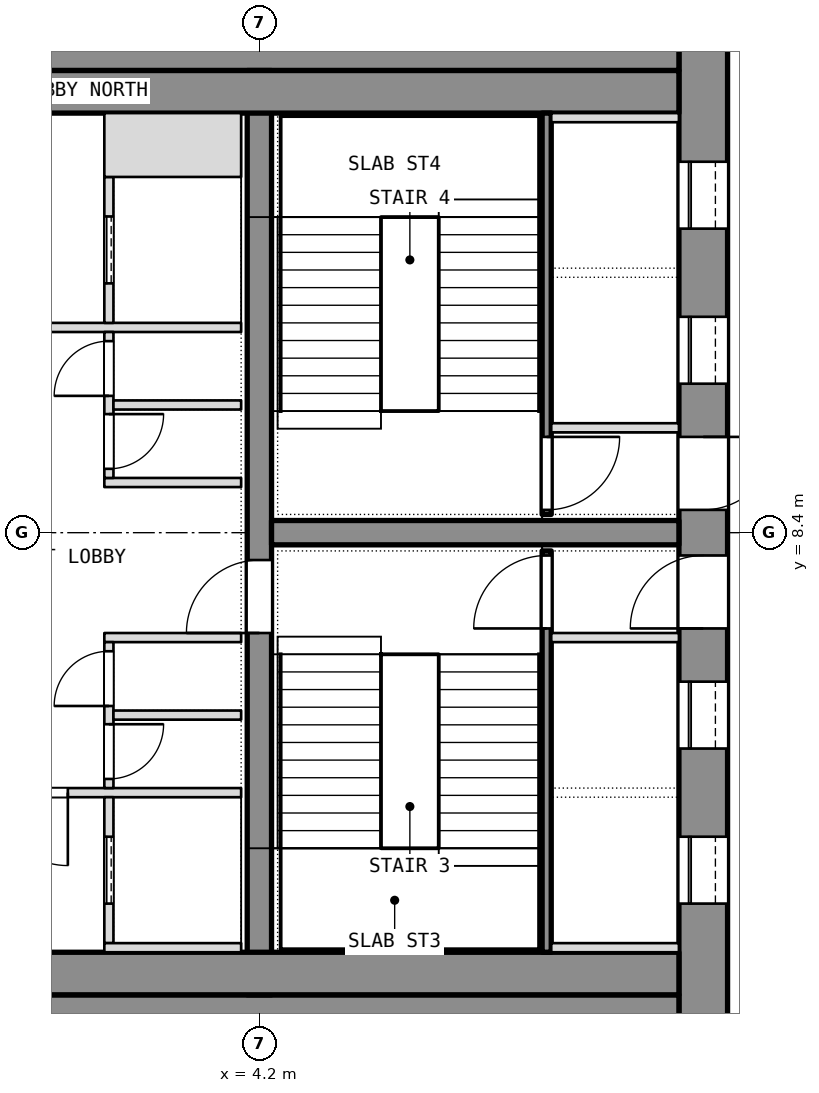
"""IFC4 building model, lengths in metres.
Left out: names, types, materials, properties, quantities, classifications, styles, units other than length and angle.
Written with IfcOpenShell. Run it as: python <this file> out.ifc"""

import sys

from ifc_helpers import new_model, si_unit, direction, frame, frame_2d, origin, place, context, subcontext, project, spatial, rectangle, extrude, element, fill, save


model = new_model("IFC4")
c1 = context("Model", 3, precision=1e-05, world=origin(), true_north=direction((0.0, 1.0)))
c2 = subcontext(c1, "Body", "Model", "MODEL_VIEW")
j1 = project(units=[si_unit("LENGTHUNIT", "METRE"), si_unit("PLANEANGLEUNIT", "RADIAN")], contexts=[c1])
p1 = place(None, origin())
s1 = spatial("IfcSite", under=j1, at=p1, CompositionType="ELEMENT")
p2 = place(p1, origin())
s2 = spatial("IfcBuilding", under=s1, at=p2, CompositionType="ELEMENT")
p3 = place(p2, frame((0.0, 0.0, 212.9)))
s3 = spatial("IfcBuildingStorey", under=s2, at=p3, CompositionType="ELEMENT", Elevation=212.9)
p4 = place(p3, frame((11.5, 0.0, 0.0), z_axis=(0.0, 0.0, 1.0), x_axis=(0.0, 1.0, 0.0)))
e1 = element("IfcWall", 1, at=p4, inside=s3, PredefinedType="SHEAR", context=c2, shape_type="SweptSolid", body=[
    extrude(rectangle(XDim=16.8, YDim=0.8, at=frame_2d((8.4, 0.0))), origin(), (0.0, 0.0, 1.0), 3.6),
])
p5 = place(p4, frame((2.3, 0.0, 0.0)))
e2 = element("IfcOpeningElement", 2, at=p5, cuts=e1, PredefinedType="OPENING", context=c2, shape_type="SweptSolid", body=[
    extrude(rectangle(XDim=1.1, YDim=2.1, at=frame_2d((0.55, 1.05))), frame((0.0, 0.4, 0.0), z_axis=(0.0, -1.0, 0.0), x_axis=(1.0, 0.0, 0.0)), (0.0, 0.0, 1.0), 0.8),
])
p6 = place(p4, frame((4.85, 0.0, 0.0)))
e3 = element("IfcOpeningElement", 3, at=p6, cuts=e1, PredefinedType="OPENING", context=c2, shape_type="SweptSolid", body=[
    extrude(rectangle(XDim=1.1, YDim=2.1, at=frame_2d((0.55, 1.05))), frame((0.0, 0.4, 0.0), z_axis=(0.0, -1.0, 0.0), x_axis=(1.0, 0.0, 0.0)), (0.0, 0.0, 1.0), 0.8),
])
p7 = place(p4, frame((6.825, 0.0, 0.0)))
e4 = element("IfcOpeningElement", 4, at=p7, cuts=e1, PredefinedType="OPENING", context=c2, shape_type="SweptSolid", body=[
    extrude(rectangle(XDim=1.2, YDim=2.1, at=frame_2d((0.6, 1.05))), frame((0.0, 0.4, 0.0), z_axis=(0.0, -1.0, 0.0), x_axis=(1.0, 0.0, 0.0)), (0.0, 0.0, 1.0), 0.8),
])
p8 = place(p4, frame((13.4, 0.0, 0.0)))
e5 = element("IfcOpeningElement", 5, at=p8, cuts=e1, PredefinedType="OPENING", context=c2, shape_type="SweptSolid", body=[
    extrude(rectangle(XDim=1.1, YDim=2.1, at=frame_2d((0.55, 1.05))), frame((0.0, 0.4, 0.0), z_axis=(0.0, -1.0, 0.0), x_axis=(1.0, 0.0, 0.0)), (0.0, 0.0, 1.0), 0.8),
])
p9 = place(p4, frame((10.85, 0.0, 0.0)))
e6 = element("IfcOpeningElement", 6, at=p9, cuts=e1, PredefinedType="OPENING", context=c2, shape_type="SweptSolid", body=[
    extrude(rectangle(XDim=1.1, YDim=2.1, at=frame_2d((0.55, 1.05))), frame((0.0, 0.4, 0.0), z_axis=(0.0, -1.0, 0.0), x_axis=(1.0, 0.0, 0.0)), (0.0, 0.0, 1.0), 0.8),
])
p10 = place(p4, frame((8.775, 0.0, 0.0)))
e7 = element("IfcOpeningElement", 7, at=p10, cuts=e1, PredefinedType="OPENING", context=c2, shape_type="SweptSolid", body=[
    extrude(rectangle(XDim=1.2, YDim=2.1, at=frame_2d((0.6, 1.05))), frame((0.0, 0.4, 0.0), z_axis=(0.0, -1.0, 0.0), x_axis=(1.0, 0.0, 0.0)), (0.0, 0.0, 1.0), 0.8),
])
for number, where, z_axis, x_axis in (
    (8, (-11.1, 0.4, 0.0), (0.0, 0.0, 1.0), (1.0, 0.0, 0.0)),
    (9, (-11.1, 16.4, 0.0), (0.0, 0.0, 1.0), (1.0, 0.0, 0.0)),
):
    element("IfcWall", number, at=place(p3, frame(where, z_axis=z_axis, x_axis=x_axis)), inside=s3, PredefinedType="SHEAR", context=c2, shape_type="SweptSolid", body=[
        extrude(rectangle(XDim=22.2, YDim=0.8, at=frame_2d((11.1, 0.0))), origin(), (0.0, 0.0, 1.0), 3.6),
    ])
p11 = place(p3, frame((4.2, 0.8, 0.0), z_axis=(0.0, 0.0, 1.0), x_axis=(0.0, 1.0, 0.0)))
e10 = element("IfcWall", 10, at=p11, inside=s3, PredefinedType="SHEAR", context=c2, shape_type="SweptSolid", body=[
    extrude(rectangle(XDim=15.2, YDim=0.4, at=frame_2d((7.6, 0.0))), origin(), (0.0, 0.0, 1.0), 3.6),
])
p12 = place(p11, frame((5.95, 0.0, 0.0)))
e11 = element("IfcOpeningElement", 11, at=p12, cuts=e10, PredefinedType="OPENING", context=c2, shape_type="SweptSolid", body=[
    extrude(rectangle(XDim=1.2, YDim=2.1, at=frame_2d((0.6, 1.05))), frame((0.0, 0.2, 0.0), z_axis=(0.0, -1.0, 0.0), x_axis=(1.0, 0.0, 0.0)), (0.0, 0.0, 1.0), 0.4),
])
p13 = place(p3, frame((4.4, 8.4, 0.0), z_axis=(0.0, 0.0, 1.0), x_axis=(1.0, 0.0, 0.0)))
e12 = element("IfcWall", 12, at=p13, inside=s3, PredefinedType="SHEAR", context=c2, shape_type="SweptSolid", body=[
    extrude(rectangle(XDim=6.7, YDim=0.4, at=frame_2d((3.35, 0.0))), origin(), (0.0, 0.0, 1.0), 3.6),
])
for number, where, z_axis, x_axis in (
    (13, (-11.1, 1.15, 0.0), (0.0, 0.0, 1.0), (1.0, 0.0, 0.0)),
    (14, (-11.1, 15.65, 0.0), (0.0, 0.0, 1.0), (1.0, 0.0, 0.0)),
):
    element("IfcWall", number, at=place(p3, frame(where, z_axis=z_axis, x_axis=x_axis)), inside=s3, PredefinedType="PARTITIONING", context=c2, shape_type="SweptSolid", body=[
        extrude(rectangle(XDim=22.2, YDim=0.7, at=frame_2d((11.1, 0.0))), origin(), (0.0, 0.0, 1.0), 3.34),
    ])
p14 = place(p3, frame((8.925, 1.5, 0.0), z_axis=(0.0, 0.0, 1.0), x_axis=(0.0, 1.0, 0.0)))
e15 = element("IfcWall", 15, at=p14, inside=s3, PredefinedType="SHEAR", context=c2, shape_type="SweptSolid", body=[
    extrude(rectangle(XDim=6.6, YDim=0.15, at=frame_2d((3.3, 0.0))), origin(), (0.0, 0.0, 1.0), 3.34),
])
p15 = place(p14, frame((5.325, 0.0, 0.0)))
e16 = element("IfcOpeningElement", 16, at=p15, cuts=e15, PredefinedType="OPENING", context=c2, shape_type="SweptSolid", body=[
    extrude(rectangle(XDim=1.2, YDim=2.1, at=frame_2d((0.6, 1.05))), frame((0.0, 0.075, 0.0), z_axis=(0.0, -1.0, 0.0), x_axis=(1.0, 0.0, 0.0)), (0.0, 0.0, 1.0), 0.15),
])
for number, where, z_axis, x_axis in (
    (17, (9.0, 6.675, 0.0), (0.0, 0.0, 1.0), (1.0, 0.0, 0.0)),
    (18, (9.0, 1.575, 0.0), (0.0, 0.0, 1.0), (1.0, 0.0, 0.0)),
):
    element("IfcWall", number, at=place(p3, frame(where, z_axis=z_axis, x_axis=x_axis)), inside=s3, PredefinedType="SHEAR", context=c2, shape_type="SweptSolid", body=[
        extrude(rectangle(XDim=2.1, YDim=0.15, at=frame_2d((1.05, 0.0))), origin(), (0.0, 0.0, 1.0), 3.6),
    ])
p16 = place(p3, frame((8.925, 8.7, 0.0), z_axis=(0.0, 0.0, 1.0), x_axis=(0.0, 1.0, 0.0)))
e19 = element("IfcWall", 19, at=p16, inside=s3, PredefinedType="SHEAR", context=c2, shape_type="SweptSolid", body=[
    extrude(rectangle(XDim=6.6, YDim=0.15, at=frame_2d((3.3, 0.0))), origin(), (0.0, 0.0, 1.0), 3.34),
])
p17 = place(p16, frame((0.075, 0.0, 0.0)))
e20 = element("IfcOpeningElement", 20, at=p17, cuts=e19, PredefinedType="OPENING", context=c2, shape_type="SweptSolid", body=[
    extrude(rectangle(XDim=1.2, YDim=2.1, at=frame_2d((0.6, 1.05))), frame((0.0, 0.075, 0.0), z_axis=(0.0, -1.0, 0.0), x_axis=(1.0, 0.0, 0.0)), (0.0, 0.0, 1.0), 0.15),
])
for number, where, z_axis, x_axis in (
    (21, (9.0, 10.125, 0.0), (0.0, 0.0, 1.0), (1.0, 0.0, 0.0)),
    (22, (9.0, 15.225, 0.0), (0.0, 0.0, 1.0), (1.0, 0.0, 0.0)),
):
    element("IfcWall", number, at=place(p3, frame(where, z_axis=z_axis, x_axis=x_axis)), inside=s3, PredefinedType="SHEAR", context=c2, shape_type="SweptSolid", body=[
        extrude(rectangle(XDim=2.1, YDim=0.15, at=frame_2d((1.05, 0.0))), origin(), (0.0, 0.0, 1.0), 3.6),
    ])
p18 = place(p3, frame((-3.9, 4.125, 0.0), z_axis=(0.0, 0.0, 1.0), x_axis=(1.0, 0.0, 0.0)))
e23 = element("IfcWall", 23, at=p18, inside=s3, PredefinedType="PARTITIONING", context=c2, shape_type="SweptSolid", body=[
    extrude(rectangle(XDim=7.8, YDim=0.15, at=frame_2d((3.9, 0.0))), origin(), (0.0, 0.0, 1.0), 3.34),
])
p19 = place(p18, frame((3.75, 0.0, 0.0)))
e24 = element("IfcOpeningElement", 24, at=p19, cuts=e23, PredefinedType="OPENING", context=c2, shape_type="SweptSolid", body=[
    extrude(rectangle(XDim=1.2, YDim=2.1, at=frame_2d((0.6, 1.05))), frame((0.0, 0.075, 0.0), z_axis=(0.0, -1.0, 0.0), x_axis=(1.0, 0.0, 0.0)), (0.0, 0.0, 1.0), 0.15),
])
p20 = place(p3, frame((-3.9, 11.775, 0.0), z_axis=(0.0, 0.0, 1.0), x_axis=(1.0, 0.0, 0.0)))
e25 = element("IfcWall", 25, at=p20, inside=s3, PredefinedType="PARTITIONING", context=c2, shape_type="SweptSolid", body=[
    extrude(rectangle(XDim=7.8, YDim=0.15, at=frame_2d((3.9, 0.0))), origin(), (0.0, 0.0, 1.0), 3.34),
])
p21 = place(p20, frame((3.3, 0.0, 0.0)))
e26 = element("IfcOpeningElement", 26, at=p21, cuts=e25, PredefinedType="OPENING", context=c2, shape_type="SweptSolid", body=[
    extrude(rectangle(XDim=1.2, YDim=2.1, at=frame_2d((0.6, 1.05))), frame((0.0, 0.075, 0.0), z_axis=(0.0, -1.0, 0.0), x_axis=(1.0, 0.0, 0.0)), (0.0, 0.0, 1.0), 0.15),
])
p22 = place(p3, frame((1.725, 1.65, 0.0), z_axis=(0.0, 0.0, 1.0), x_axis=(0.0, 1.0, 0.0)))
e27 = element("IfcWall", 27, at=p22, inside=s3, PredefinedType="SHEAR", context=c2, shape_type="SweptSolid", body=[
    extrude(rectangle(XDim=2.4, YDim=0.15, at=frame_2d((1.2, 0.0))), origin(), (0.0, 0.0, 1.0), 3.6),
])
p23 = place(p22, frame((0.65, 0.0, 0.0)))
e28 = element("IfcOpeningElement", 28, at=p23, cuts=e27, PredefinedType="OPENING", context=c2, shape_type="SweptSolid", body=[
    extrude(rectangle(XDim=1.1, YDim=2.1, at=frame_2d((0.55, 1.05))), frame((0.0, 0.075, 0.0), z_axis=(0.0, -1.0, 0.0), x_axis=(1.0, 0.0, 0.0)), (0.0, 0.0, 1.0), 0.15),
])
p24 = place(p3, frame((1.65, 1.575, 0.0), z_axis=(0.0, 0.0, 1.0), x_axis=(1.0, 0.0, 0.0)))
e29 = element("IfcWall", 29, at=p24, inside=s3, PredefinedType="SHEAR", context=c2, shape_type="SweptSolid", body=[
    extrude(rectangle(XDim=2.25, YDim=0.15, at=frame_2d((1.125, 0.0))), origin(), (0.0, 0.0, 1.0), 3.6),
])
p25 = place(p3, frame((1.725, 11.85, 0.0), z_axis=(0.0, 0.0, 1.0), x_axis=(0.0, 1.0, 0.0)))
e30 = element("IfcWall", 30, at=p25, inside=s3, PredefinedType="SHEAR", context=c2, shape_type="SweptSolid", body=[
    extrude(rectangle(XDim=2.4, YDim=0.15, at=frame_2d((1.2, 0.0))), origin(), (0.0, 0.0, 1.0), 3.6),
])
p26 = place(p25, frame((0.65, 0.0, 0.0)))
e31 = element("IfcOpeningElement", 31, at=p26, cuts=e30, PredefinedType="OPENING", context=c2, shape_type="SweptSolid", body=[
    extrude(rectangle(XDim=1.1, YDim=2.1, at=frame_2d((0.55, 1.05))), frame((0.0, 0.075, 0.0), z_axis=(0.0, -1.0, 0.0), x_axis=(1.0, 0.0, 0.0)), (0.0, 0.0, 1.0), 0.15),
])
p27 = place(p3, frame((1.65, 14.775, 0.0), z_axis=(0.0, 0.0, 1.0), x_axis=(1.0, 0.0, 0.0)))
e32 = element("IfcWall", 32, at=p27, inside=s3, PredefinedType="SHEAR", context=c2, shape_type="SweptSolid", body=[
    extrude(rectangle(XDim=2.25, YDim=1.05, at=frame_2d((1.125, 0.0))), origin(), (0.0, 0.0, 1.0), 3.6),
])
for number, where, z_axis, x_axis in (
    (33, (1.65, 6.675, 0.0), (0.0, 0.0, 1.0), (1.0, 0.0, 0.0)),
    (34, (1.65, 9.225, 0.0), (0.0, 0.0, 1.0), (1.0, 0.0, 0.0)),
):
    element("IfcWall", number, at=place(p3, frame(where, z_axis=z_axis, x_axis=x_axis)), inside=s3, PredefinedType="PARTITIONING", context=c2, shape_type="SweptSolid", body=[
        extrude(rectangle(XDim=2.25, YDim=0.15, at=frame_2d((1.125, 0.0))), origin(), (0.0, 0.0, 1.0), 3.34),
    ])
p28 = place(p3, frame((1.725, 4.2, 0.0), z_axis=(0.0, 0.0, 1.0), x_axis=(0.0, 1.0, 0.0)))
e35 = element("IfcWall", 35, at=p28, inside=s3, PredefinedType="PARTITIONING", context=c2, shape_type="SweptSolid", body=[
    extrude(rectangle(XDim=2.4, YDim=0.15, at=frame_2d((1.2, 0.0))), origin(), (0.0, 0.0, 1.0), 3.34),
])
p29 = place(p28, frame((0.15, 0.0, 0.0)))
e36 = element("IfcOpeningElement", 36, at=p29, cuts=e35, PredefinedType="OPENING", context=c2, shape_type="SweptSolid", body=[
    extrude(rectangle(XDim=0.9, YDim=2.1, at=frame_2d((0.45, 1.05))), frame((0.0, 0.075, 0.0), z_axis=(0.0, -1.0, 0.0), x_axis=(1.0, 0.0, 0.0)), (0.0, 0.0, 1.0), 0.15),
])
p30 = place(p28, frame((1.35, 0.0, 0.0)))
e37 = element("IfcOpeningElement", 37, at=p30, cuts=e35, PredefinedType="OPENING", context=c2, shape_type="SweptSolid", body=[
    extrude(rectangle(XDim=0.9, YDim=2.1, at=frame_2d((0.45, 1.05))), frame((0.0, 0.075, 0.0), z_axis=(0.0, -1.0, 0.0), x_axis=(1.0, 0.0, 0.0)), (0.0, 0.0, 1.0), 0.15),
])
p31 = place(p3, frame((1.725, 9.3, 0.0), z_axis=(0.0, 0.0, 1.0), x_axis=(0.0, 1.0, 0.0)))
e38 = element("IfcWall", 38, at=p31, inside=s3, PredefinedType="PARTITIONING", context=c2, shape_type="SweptSolid", body=[
    extrude(rectangle(XDim=2.4, YDim=0.15, at=frame_2d((1.2, 0.0))), origin(), (0.0, 0.0, 1.0), 3.34),
])
p32 = place(p31, frame((0.15, 0.0, 0.0)))
e39 = element("IfcOpeningElement", 39, at=p32, cuts=e38, PredefinedType="OPENING", context=c2, shape_type="SweptSolid", body=[
    extrude(rectangle(XDim=0.9, YDim=2.1, at=frame_2d((0.45, 1.05))), frame((0.0, 0.075, 0.0), z_axis=(0.0, -1.0, 0.0), x_axis=(1.0, 0.0, 0.0)), (0.0, 0.0, 1.0), 0.15),
])
p33 = place(p31, frame((1.35, 0.0, 0.0)))
e40 = element("IfcOpeningElement", 40, at=p33, cuts=e38, PredefinedType="OPENING", context=c2, shape_type="SweptSolid", body=[
    extrude(rectangle(XDim=0.9, YDim=2.1, at=frame_2d((0.45, 1.05))), frame((0.0, 0.075, 0.0), z_axis=(0.0, -1.0, 0.0), x_axis=(1.0, 0.0, 0.0)), (0.0, 0.0, 1.0), 0.15),
])
for number, where, z_axis, x_axis in (
    (41, (1.8, 5.4, 0.0), (0.0, 0.0, 1.0), (1.0, 0.0, 0.0)),
    (42, (1.8, 10.5, 0.0), (0.0, 0.0, 1.0), (1.0, 0.0, 0.0)),
):
    element("IfcWall", number, at=place(p3, frame(where, z_axis=z_axis, x_axis=x_axis)), inside=s3, PredefinedType="PARTITIONING", context=c2, shape_type="SweptSolid", body=[
        extrude(rectangle(XDim=2.1, YDim=0.15, at=frame_2d((1.05, 0.0))), origin(), (0.0, 0.0, 1.0), 3.34),
    ])
p34 = place(p5, origin())
e43 = element("IfcDoor", 43, at=p34, inside=s3, OperationType="SLIDING_TO_LEFT", PredefinedType="DOOR", context=c2, shape_type="SweptSolid", body=[
    extrude(rectangle(XDim=1.1, YDim=2.1, at=frame_2d((0.55, 1.05))), frame((0.0, 0.025, 0.0), z_axis=(0.0, -1.0, 0.0), x_axis=(1.0, 0.0, 0.0)), (0.0, 0.0, 1.0), 0.05),
])
fill(e2, e43)
p35 = place(p6, origin())
e44 = element("IfcDoor", 44, at=p35, inside=s3, OperationType="SLIDING_TO_LEFT", PredefinedType="DOOR", context=c2, shape_type="SweptSolid", body=[
    extrude(rectangle(XDim=1.1, YDim=2.1, at=frame_2d((0.55, 1.05))), frame((0.0, 0.025, 0.0), z_axis=(0.0, -1.0, 0.0), x_axis=(1.0, 0.0, 0.0)), (0.0, 0.0, 1.0), 0.05),
])
fill(e3, e44)
p36 = place(p7, origin())
e45 = element("IfcDoor", 45, at=p36, inside=s3, OperationType="SINGLE_SWING_LEFT", PredefinedType="DOOR", context=c2, shape_type="SweptSolid", body=[
    extrude(rectangle(XDim=1.2, YDim=2.1, at=frame_2d((0.6, 1.05))), frame((0.0, 0.025, 0.0), z_axis=(0.0, -1.0, 0.0), x_axis=(1.0, 0.0, 0.0)), (0.0, 0.0, 1.0), 0.05),
])
fill(e4, e45)
p37 = place(p15, origin())
e46 = element("IfcDoor", 46, at=p37, inside=s3, OperationType="SINGLE_SWING_LEFT", PredefinedType="DOOR", context=c2, shape_type="SweptSolid", body=[
    extrude(rectangle(XDim=1.2, YDim=2.1, at=frame_2d((0.6, 1.05))), frame((0.0, 0.025, 0.0), z_axis=(0.0, -1.0, 0.0), x_axis=(1.0, 0.0, 0.0)), (0.0, 0.0, 1.0), 0.05),
])
fill(e16, e46)
p38 = place(p8, origin())
e47 = element("IfcDoor", 47, at=p38, inside=s3, OperationType="SLIDING_TO_LEFT", PredefinedType="DOOR", context=c2, shape_type="SweptSolid", body=[
    extrude(rectangle(XDim=1.1, YDim=2.1, at=frame_2d((0.55, 1.05))), frame((0.0, 0.025, 0.0), z_axis=(0.0, -1.0, 0.0), x_axis=(1.0, 0.0, 0.0)), (0.0, 0.0, 1.0), 0.05),
])
fill(e5, e47)
p39 = place(p9, origin())
e48 = element("IfcDoor", 48, at=p39, inside=s3, OperationType="SLIDING_TO_LEFT", PredefinedType="DOOR", context=c2, shape_type="SweptSolid", body=[
    extrude(rectangle(XDim=1.1, YDim=2.1, at=frame_2d((0.55, 1.05))), frame((0.0, 0.025, 0.0), z_axis=(0.0, -1.0, 0.0), x_axis=(1.0, 0.0, 0.0)), (0.0, 0.0, 1.0), 0.05),
])
fill(e6, e48)
p40 = place(p10, origin())
e49 = element("IfcDoor", 49, at=p40, inside=s3, OperationType="SINGLE_SWING_LEFT", PredefinedType="DOOR", context=c2, shape_type="SweptSolid", body=[
    extrude(rectangle(XDim=1.2, YDim=2.1, at=frame_2d((0.6, 1.05))), frame((0.0, 0.025, 0.0), z_axis=(0.0, -1.0, 0.0), x_axis=(1.0, 0.0, 0.0)), (0.0, 0.0, 1.0), 0.05),
])
fill(e7, e49)
p41 = place(p17, origin())
e50 = element("IfcDoor", 50, at=p41, inside=s3, OperationType="SINGLE_SWING_LEFT", PredefinedType="DOOR", context=c2, shape_type="SweptSolid", body=[
    extrude(rectangle(XDim=1.2, YDim=2.1, at=frame_2d((0.6, 1.05))), frame((0.0, 0.025, 0.0), z_axis=(0.0, -1.0, 0.0), x_axis=(1.0, 0.0, 0.0)), (0.0, 0.0, 1.0), 0.05),
])
fill(e20, e50)
p42 = place(p29, origin())
e51 = element("IfcDoor", 51, at=p42, inside=s3, OperationType="SINGLE_SWING_LEFT", PredefinedType="DOOR", context=c2, shape_type="SweptSolid", body=[
    extrude(rectangle(XDim=0.9, YDim=2.1, at=frame_2d((0.45, 1.05))), frame((0.0, 0.025, 0.0), z_axis=(0.0, -1.0, 0.0), x_axis=(1.0, 0.0, 0.0)), (0.0, 0.0, 1.0), 0.05),
])
fill(e36, e51)
p43 = place(p30, origin())
e52 = element("IfcDoor", 52, at=p43, inside=s3, OperationType="SINGLE_SWING_LEFT", PredefinedType="DOOR", context=c2, shape_type="SweptSolid", body=[
    extrude(rectangle(XDim=0.9, YDim=2.1, at=frame_2d((0.45, 1.05))), frame((0.0, 0.025, 0.0), z_axis=(0.0, -1.0, 0.0), x_axis=(1.0, 0.0, 0.0)), (0.0, 0.0, 1.0), 0.05),
])
fill(e37, e52)
p44 = place(p32, origin())
e53 = element("IfcDoor", 53, at=p44, inside=s3, OperationType="SINGLE_SWING_LEFT", PredefinedType="DOOR", context=c2, shape_type="SweptSolid", body=[
    extrude(rectangle(XDim=0.9, YDim=2.1, at=frame_2d((0.45, 1.05))), frame((0.0, 0.025, 0.0), z_axis=(0.0, -1.0, 0.0), x_axis=(1.0, 0.0, 0.0)), (0.0, 0.0, 1.0), 0.05),
])
fill(e39, e53)
p45 = place(p33, origin())
e54 = element("IfcDoor", 54, at=p45, inside=s3, OperationType="SINGLE_SWING_LEFT", PredefinedType="DOOR", context=c2, shape_type="SweptSolid", body=[
    extrude(rectangle(XDim=0.9, YDim=2.1, at=frame_2d((0.45, 1.05))), frame((0.0, 0.025, 0.0), z_axis=(0.0, -1.0, 0.0), x_axis=(1.0, 0.0, 0.0)), (0.0, 0.0, 1.0), 0.05),
])
fill(e40, e54)
p46 = place(p23, origin())
e55 = element("IfcDoor", 55, at=p46, inside=s3, OperationType="SLIDING_TO_LEFT", PredefinedType="DOOR", context=c2, shape_type="SweptSolid", body=[
    extrude(rectangle(XDim=1.1, YDim=2.1, at=frame_2d((0.55, 1.05))), frame((0.0, 0.025, 0.0), z_axis=(0.0, -1.0, 0.0), x_axis=(1.0, 0.0, 0.0)), (0.0, 0.0, 1.0), 0.05),
])
fill(e28, e55)
p47 = place(p26, origin())
e56 = element("IfcDoor", 56, at=p47, inside=s3, OperationType="SLIDING_TO_LEFT", PredefinedType="DOOR", context=c2, shape_type="SweptSolid", body=[
    extrude(rectangle(XDim=1.1, YDim=2.1, at=frame_2d((0.55, 1.05))), frame((0.0, 0.025, 0.0), z_axis=(0.0, -1.0, 0.0), x_axis=(1.0, 0.0, 0.0)), (0.0, 0.0, 1.0), 0.05),
])
fill(e31, e56)
p48 = place(p19, origin())
e57 = element("IfcDoor", 57, at=p48, inside=s3, OperationType="SINGLE_SWING_LEFT", PredefinedType="DOOR", context=c2, shape_type="SweptSolid", body=[
    extrude(rectangle(XDim=1.2, YDim=2.1, at=frame_2d((0.6, 1.05))), frame((0.0, 0.025, 0.0), z_axis=(0.0, -1.0, 0.0), x_axis=(1.0, 0.0, 0.0)), (0.0, 0.0, 1.0), 0.05),
])
fill(e24, e57)
p49 = place(p12, origin())
e58 = element("IfcDoor", 58, at=p49, inside=s3, OperationType="SINGLE_SWING_LEFT", PredefinedType="DOOR", context=c2, shape_type="SweptSolid", body=[
    extrude(rectangle(XDim=1.2, YDim=2.1, at=frame_2d((0.6, 1.05))), frame((0.0, 0.025, 0.0), z_axis=(0.0, -1.0, 0.0), x_axis=(1.0, 0.0, 0.0)), (0.0, 0.0, 1.0), 0.05),
])
fill(e11, e58)
save(model, sys.argv[1])
